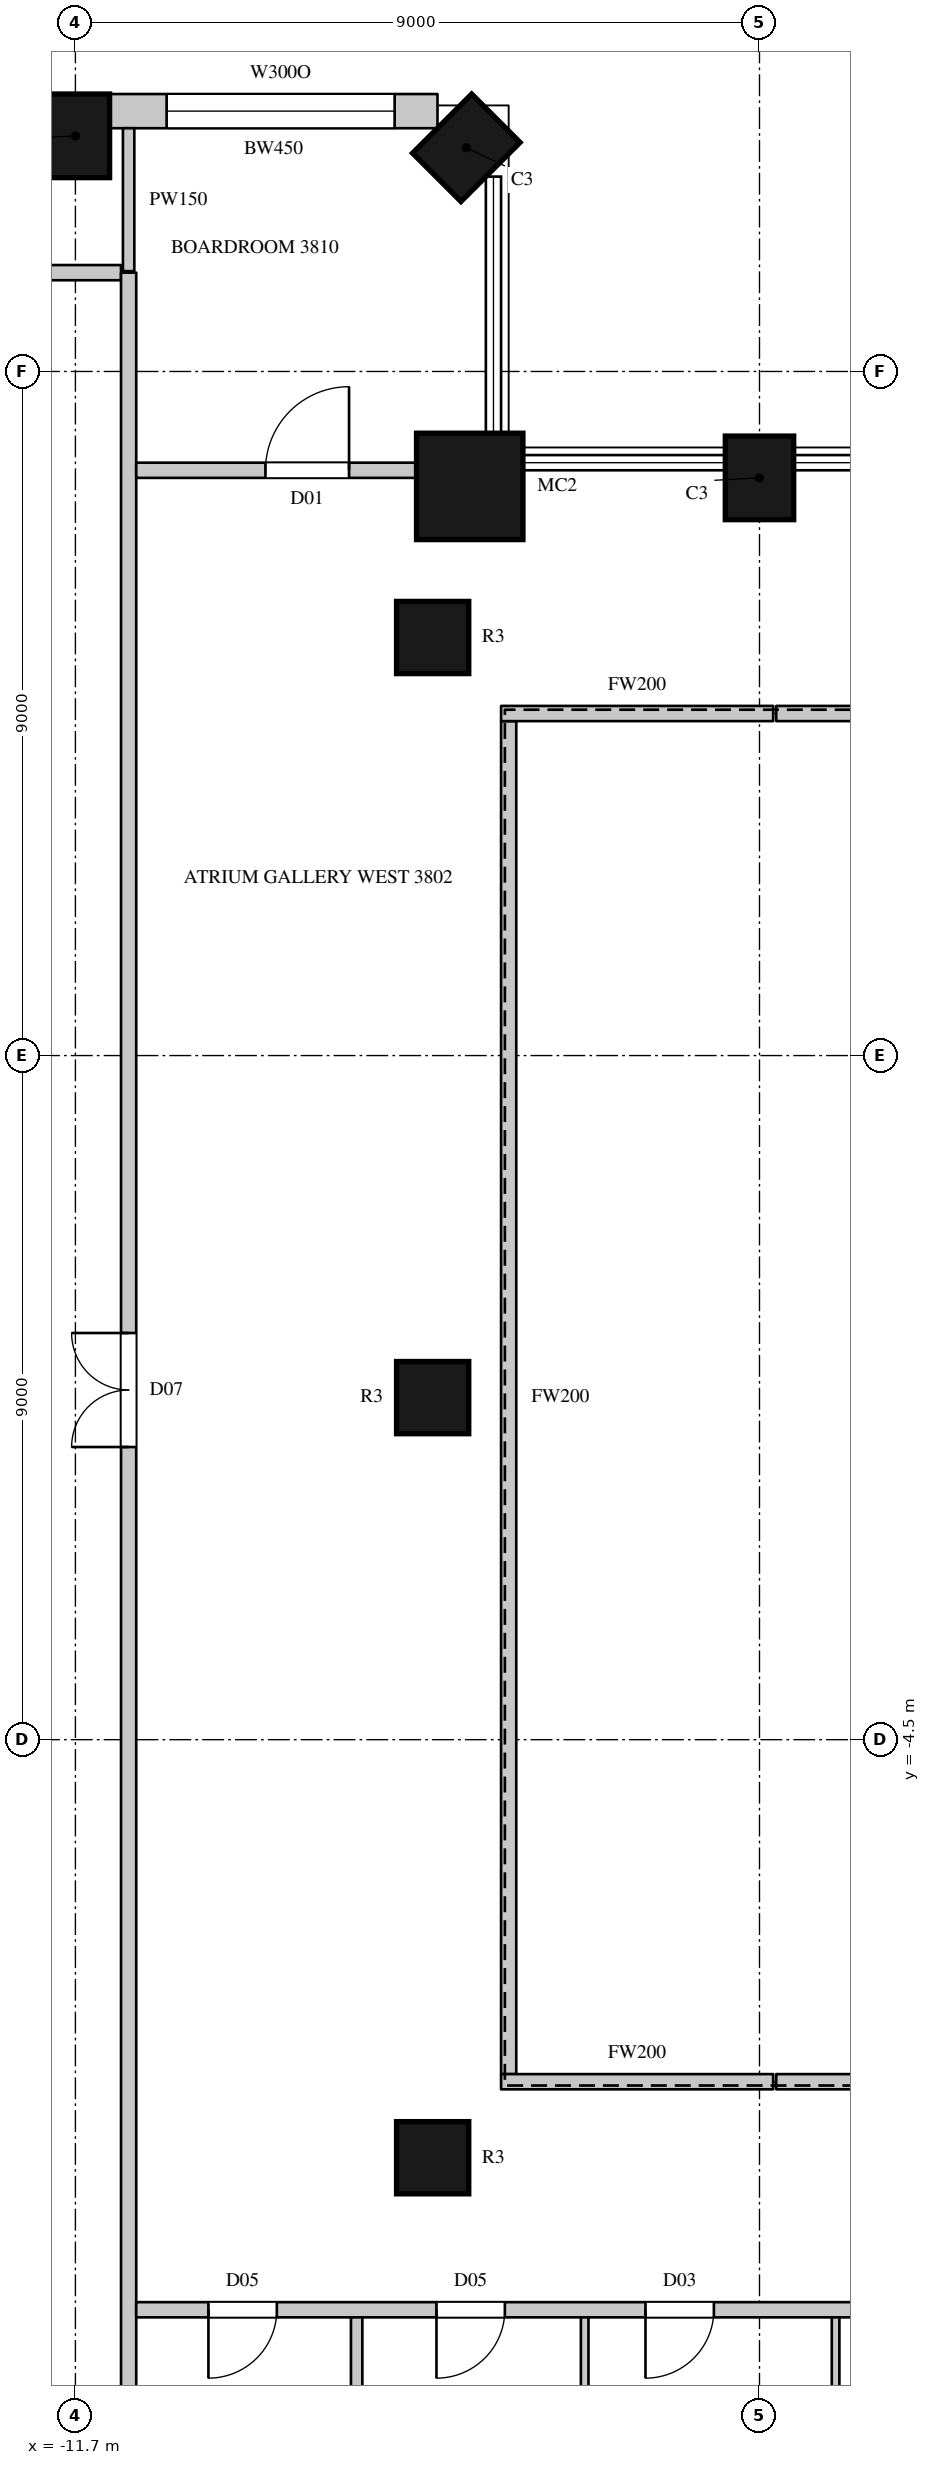
"""IFC4 building model, lengths in metres.
Left out: names, types, materials, properties, quantities, classifications, styles, units other than length and angle.
Written with IfcOpenShell. Run it as: python <this file> out.ifc"""

import sys

from ifc_helpers import new_model, si_unit, direction, frame, frame_2d, origin, origin_2d, place, context, subcontext, project, spatial, rectangle, circle, extrude, element, fill, save


model = new_model("IFC4")
c1 = context("Model", 3, precision=1e-05, world=origin(), true_north=direction((0.0, 1.0)))
c2 = subcontext(c1, "Body", "Model", "MODEL_VIEW")
j1 = project(units=[si_unit("LENGTHUNIT", "METRE"), si_unit("PLANEANGLEUNIT", "RADIAN")], contexts=[c1])
p1 = place(None, origin())
s1 = spatial("IfcSite", under=j1, at=p1, CompositionType="ELEMENT")
p2 = place(p1, origin())
s2 = spatial("IfcBuilding", under=s1, at=p2, CompositionType="ELEMENT")
p3 = place(p2, frame((0.0, 0.0, 176.9)))
s3 = spatial("IfcBuildingStorey", under=s2, at=p3, CompositionType="ELEMENT", Elevation=176.9)
p4 = place(p3, frame((-2.7, 12.1, 0.0), z_axis=(0.0, 0.0, 1.0), x_axis=(-1.0, 0.0, 0.0)))
e1 = element("IfcColumn", 1, at=p4, inside=s3, PredefinedType="COLUMN", context=c2, shape_type="SweptSolid", body=[
    extrude(rectangle(XDim=0.9, YDim=1.1, at=origin_2d()), origin(), (0.0, 0.0, 1.0), 4.1),
])
p5 = place(p3, frame((-6.512, 11.988, 0.0), z_axis=(0.0, 0.0, 1.0), x_axis=(1.0, 0.0, 0.0)))
e2 = element("IfcColumn", 2, at=p5, inside=s3, PredefinedType="COLUMN", context=c2, shape_type="SweptSolid", body=[
    extrude(circle(Radius=0.7, at=origin_2d()), origin(), (0.0, 0.0, 1.0), 4.1),
])
for number, where, z_axis, x_axis in (
    (3, (-6.557, 16.443, 0.0), (0.0, 0.0, 1.0), (-0.707, 0.707, 0.0)),
    (4, (-11.7, 16.6, 0.0), (0.0, 0.0, 1.0), (-1.0, 0.0, 0.0)),
):
    element("IfcColumn", number, at=place(p3, frame(where, z_axis=z_axis, x_axis=x_axis)), inside=s3, PredefinedType="COLUMN", context=c2, shape_type="SweptSolid", body=[
        extrude(rectangle(XDim=0.9, YDim=1.1, at=origin_2d()), origin(), (0.0, 0.0, 1.0), 4.1),
    ])
for number, where, z_axis, x_axis in (
    (5, (-7.0, -10.0, 0.0), (0.0, 0.0, 1.0), (1.0, 0.0, 0.0)),
    (6, (-7.0, 0.0, 0.0), (0.0, 0.0, 1.0), (1.0, 0.0, 0.0)),
    (7, (-7.0, 10.0, 0.0), (0.0, 0.0, 1.0), (1.0, 0.0, 0.0)),
):
    element("IfcColumn", number, at=place(p3, frame(where, z_axis=z_axis, x_axis=x_axis)), inside=s3, PredefinedType="COLUMN", context=c2, shape_type="SweptSolid", body=[
        extrude(circle(Radius=0.475, at=origin_2d()), origin(), (0.0, 0.0, 1.0), 4.1),
    ])
p6 = place(p3, frame((-6.936, 16.925, 0.0), z_axis=(0.0, 0.0, 1.0), x_axis=(-1.0, 0.0, 0.0)))
e8 = element("IfcWall", 8, at=p6, inside=s3, PredefinedType="SOLIDWALL", context=c2, shape_type="SweptSolid", body=[
    extrude(rectangle(XDim=4.314, YDim=0.45, at=frame_2d((2.157, 0.0))), origin(), (0.0, 0.0, 1.0), 3.8),
])
p7 = place(p6, frame((0.564, 0.0, 1.05)))
e9 = element("IfcOpeningElement", 9, at=p7, cuts=e8, PredefinedType="OPENING", context=c2, shape_type="SweptSolid", body=[
    extrude(rectangle(XDim=3.0, YDim=2.4, at=frame_2d((1.5, 1.2))), frame((0.0, 0.235, 0.0), z_axis=(0.0, -1.0, 0.0), x_axis=(1.0, 0.0, 0.0)), (0.0, 0.0, 1.0), 0.47),
])
p8 = place(p3, frame((-13.97, 14.8, 0.0), z_axis=(0.0, 0.0, 1.0), x_axis=(1.0, 0.0, 0.0)))
e10 = element("IfcWall", 10, at=p8, inside=s3, PredefinedType="PARTITIONING", context=c2, shape_type="SweptSolid", body=[
    extrude(rectangle(XDim=2.87, YDim=0.2, at=frame_2d((1.435, 0.0))), origin(), (0.0, 0.0, 1.0), 3.8),
])
p9 = place(p3, frame((-11.0, -14.8, 0.0), z_axis=(0.0, 0.0, 1.0), x_axis=(0.0, 1.0, 0.0)))
e11 = element("IfcWall", 11, at=p9, inside=s3, PredefinedType="PARTITIONING", context=c2, shape_type="SweptSolid", body=[
    extrude(rectangle(XDim=29.6, YDim=0.2, at=frame_2d((14.8, 0.0))), origin(), (0.0, 0.0, 1.0), 3.8),
])
p10 = place(p9, frame((14.15, 0.0, 0.0)))
e12 = element("IfcOpeningElement", 12, at=p10, cuts=e11, PredefinedType="OPENING", context=c2, shape_type="SweptSolid", body=[
    extrude(rectangle(XDim=1.5, YDim=2.4, at=frame_2d((0.75, 1.2))), frame((0.0, 0.11, 0.0), z_axis=(0.0, -1.0, 0.0), x_axis=(1.0, 0.0, 0.0)), (0.0, 0.0, 1.0), 0.22),
])
p11 = place(p3, frame((-10.9, -12.0, 0.0), z_axis=(0.0, 0.0, 1.0), x_axis=(1.0, 0.0, 0.0)))
e13 = element("IfcWall", 13, at=p11, inside=s3, PredefinedType="PARTITIONING", context=c2, shape_type="SweptSolid", body=[
    extrude(rectangle(XDim=21.8, YDim=0.2, at=frame_2d((10.9, 0.0))), origin(), (0.0, 0.0, 1.0), 3.8),
])
p12 = place(p11, frame((0.95, 0.0, 0.0)))
e14 = element("IfcOpeningElement", 14, at=p12, cuts=e13, PredefinedType="OPENING", context=c2, shape_type="SweptSolid", body=[
    extrude(rectangle(XDim=0.9, YDim=2.2, at=frame_2d((0.45, 1.1))), frame((0.0, 0.11, 0.0), z_axis=(0.0, -1.0, 0.0), x_axis=(1.0, 0.0, 0.0)), (0.0, 0.0, 1.0), 0.22),
])
p13 = place(p11, frame((3.95, 0.0, 0.0)))
e15 = element("IfcOpeningElement", 15, at=p13, cuts=e13, PredefinedType="OPENING", context=c2, shape_type="SweptSolid", body=[
    extrude(rectangle(XDim=0.9, YDim=2.2, at=frame_2d((0.45, 1.1))), frame((0.0, 0.11, 0.0), z_axis=(0.0, -1.0, 0.0), x_axis=(1.0, 0.0, 0.0)), (0.0, 0.0, 1.0), 0.22),
])
p14 = place(p11, frame((6.7, 0.0, 0.0)))
e16 = element("IfcOpeningElement", 16, at=p14, cuts=e13, PredefinedType="OPENING", context=c2, shape_type="SweptSolid", body=[
    extrude(rectangle(XDim=0.9, YDim=2.2, at=frame_2d((0.45, 1.1))), frame((0.0, 0.11, 0.0), z_axis=(0.0, -1.0, 0.0), x_axis=(1.0, 0.0, 0.0)), (0.0, 0.0, 1.0), 0.22),
])
p15 = place(p11, frame((10.0, 0.0, 0.0)))
e17 = element("IfcOpeningElement", 17, at=p15, cuts=e13, PredefinedType="OPENING", context=c2, shape_type="SweptSolid", body=[
    extrude(rectangle(XDim=0.9, YDim=2.2, at=frame_2d((0.45, 1.1))), frame((0.0, 0.11, 0.0), z_axis=(0.0, -1.0, 0.0), x_axis=(1.0, 0.0, 0.0)), (0.0, 0.0, 1.0), 0.22),
])
p16 = place(p11, frame((13.55, 0.0, 0.0)))
e18 = element("IfcOpeningElement", 18, at=p16, cuts=e13, PredefinedType="OPENING", context=c2, shape_type="SweptSolid", body=[
    extrude(rectangle(XDim=0.9, YDim=2.2, at=frame_2d((0.45, 1.1))), frame((0.0, 0.11, 0.0), z_axis=(0.0, -1.0, 0.0), x_axis=(1.0, 0.0, 0.0)), (0.0, 0.0, 1.0), 0.22),
])
p17 = place(p11, frame((15.8, 0.0, 0.0)))
e19 = element("IfcOpeningElement", 19, at=p17, cuts=e13, PredefinedType="OPENING", context=c2, shape_type="SweptSolid", body=[
    extrude(rectangle(XDim=1.1, YDim=2.4, at=frame_2d((0.55, 1.2))), frame((0.0, 0.11, 0.0), z_axis=(0.0, -1.0, 0.0), x_axis=(1.0, 0.0, 0.0)), (0.0, 0.0, 1.0), 0.22),
])
p18 = place(p11, frame((18.0, 0.0, 0.0)))
e20 = element("IfcOpeningElement", 20, at=p18, cuts=e13, PredefinedType="OPENING", context=c2, shape_type="SweptSolid", body=[
    extrude(rectangle(XDim=1.1, YDim=2.4, at=frame_2d((0.55, 1.2))), frame((0.0, 0.11, 0.0), z_axis=(0.0, -1.0, 0.0), x_axis=(1.0, 0.0, 0.0)), (0.0, 0.0, 1.0), 0.22),
])
p19 = place(p3, frame((-10.9, 12.2, 0.0), z_axis=(0.0, 0.0, 1.0), x_axis=(1.0, 0.0, 0.0)))
e21 = element("IfcWall", 21, at=p19, inside=s3, PredefinedType="PARTITIONING", context=c2, shape_type="SweptSolid", body=[
    extrude(rectangle(XDim=3.704, YDim=0.2, at=frame_2d((1.852, 0.0))), origin(), (0.0, 0.0, 1.0), 3.8),
])
p20 = place(p19, frame((1.7, 0.0, 0.0)))
e22 = element("IfcOpeningElement", 22, at=p20, cuts=e21, PredefinedType="OPENING", context=c2, shape_type="SweptSolid", body=[
    extrude(rectangle(XDim=1.1, YDim=2.4, at=frame_2d((0.55, 1.2))), frame((0.0, 0.11, 0.0), z_axis=(0.0, -1.0, 0.0), x_axis=(1.0, 0.0, 0.0)), (0.0, 0.0, 1.0), 0.22),
])
p21 = place(p3, frame((-6.0, -8.9, 0.0), z_axis=(0.0, 0.0, 1.0), x_axis=(0.0, 1.0, 0.0)))
e23 = element("IfcWall", 23, at=p21, inside=s3, PredefinedType="PARTITIONING", context=c2, shape_type="SweptSolid", body=[
    extrude(rectangle(XDim=17.8, YDim=0.2, at=frame_2d((8.9, 0.0))), origin(), (0.0, 0.0, 1.0), 3.8),
])
for number, where, z_axis, x_axis in (
    (24, (-6.1, -9.0, 0.0), (0.0, 0.0, 1.0), (1.0, 0.0, 0.0)),
    (25, (-6.1, 9.0, 0.0), (0.0, 0.0, 1.0), (1.0, 0.0, 0.0)),
):
    element("IfcWall", number, at=place(p3, frame(where, z_axis=z_axis, x_axis=x_axis)), inside=s3, PredefinedType="PARTITIONING", context=c2, shape_type="SweptSolid", body=[
        extrude(rectangle(XDim=3.58, YDim=0.2, at=frame_2d((1.79, 0.0))), origin(), (0.0, 0.0, 1.0), 3.8),
    ])
for number, where, z_axis, x_axis in (
    (26, (-2.48, -9.0, 0.0), (0.0, 0.0, 1.0), (1.0, 0.0, 0.0)),
    (27, (-2.48, 9.0, 0.0), (0.0, 0.0, 1.0), (1.0, 0.0, 0.0)),
):
    element("IfcWall", number, at=place(p3, frame(where, z_axis=z_axis, x_axis=x_axis)), inside=s3, PredefinedType="PARTITIONING", context=c2, shape_type="SweptSolid", body=[
        extrude(rectangle(XDim=10.58, YDim=0.2, at=frame_2d((5.29, 0.0))), origin(), (0.0, 0.0, 1.0), 3.8),
    ])
p22 = place(p3, frame((-11.0, 14.82, 0.0), z_axis=(0.0, 0.0, 1.0), x_axis=(0.0, 1.0, 0.0)))
e28 = element("IfcWall", 28, at=p22, inside=s3, PredefinedType="PARTITIONING", context=c2, shape_type="SweptSolid", body=[
    extrude(rectangle(XDim=1.88, YDim=0.15, at=frame_2d((0.94, 0.0))), origin(), (0.0, 0.0, 1.0), 3.8),
])
p23 = place(p3, frame((-8.0, -16.7, 0.0), z_axis=(0.0, 0.0, 1.0), x_axis=(0.0, 1.0, 0.0)))
e29 = element("IfcWall", 29, at=p23, inside=s3, PredefinedType="PARTITIONING", context=c2, shape_type="SweptSolid", body=[
    extrude(rectangle(XDim=4.6, YDim=0.15, at=frame_2d((2.3, 0.0))), origin(), (0.0, 0.0, 1.0), 3.8),
])
for number, where, z_axis, x_axis in (
    (30, (-5.0, -16.7, 0.0), (0.0, 0.0, 1.0), (0.0, 1.0, 0.0)),
    (31, (-1.699, -16.7, 0.0), (0.0, 0.0, 1.0), (0.0, 1.0, 0.0)),
):
    element("IfcWall", number, at=place(p3, frame(where, z_axis=z_axis, x_axis=x_axis)), inside=s3, PredefinedType="PARTITIONING", context=c2, shape_type="SweptSolid", body=[
        extrude(rectangle(XDim=4.6, YDim=0.1, at=frame_2d((2.3, 0.0))), origin(), (0.0, 0.0, 1.0), 3.8),
    ])
p24 = place(p7, origin())
e32 = element("IfcWindow", 32, at=p24, inside=s3, PartitioningType="SINGLE_PANEL", PredefinedType="WINDOW", context=c2, shape_type="SweptSolid", body=[
    extrude(rectangle(XDim=3.0, YDim=2.4, at=frame_2d((1.5, 1.2))), frame((0.0, 0.135, 0.0), z_axis=(0.0, -1.0, 0.0), x_axis=(1.0, 0.0, 0.0)), (0.0, 0.0, 1.0), 0.06),
])
fill(e9, e32)
p25 = place(p10, origin())
e33 = element("IfcDoor", 33, at=p25, inside=s3, OperationType="DOUBLE_DOOR_SINGLE_SWING", PredefinedType="DOOR", context=c2, shape_type="SweptSolid", body=[
    extrude(rectangle(XDim=1.5, YDim=2.4, at=frame_2d((0.75, 1.2))), frame((0.0, 0.025, 0.0), z_axis=(0.0, -1.0, 0.0), x_axis=(1.0, 0.0, 0.0)), (0.0, 0.0, 1.0), 0.05),
])
fill(e12, e33)
p26 = place(p12, origin())
e34 = element("IfcDoor", 34, at=p26, inside=s3, OperationType="SINGLE_SWING_RIGHT", PredefinedType="DOOR", context=c2, shape_type="SweptSolid", body=[
    extrude(rectangle(XDim=0.9, YDim=2.2, at=frame_2d((0.45, 1.1))), frame((0.0, 0.025, 0.0), z_axis=(0.0, -1.0, 0.0), x_axis=(1.0, 0.0, 0.0)), (0.0, 0.0, 1.0), 0.05),
])
fill(e14, e34)
p27 = place(p13, origin())
e35 = element("IfcDoor", 35, at=p27, inside=s3, OperationType="SINGLE_SWING_RIGHT", PredefinedType="DOOR", context=c2, shape_type="SweptSolid", body=[
    extrude(rectangle(XDim=0.9, YDim=2.2, at=frame_2d((0.45, 1.1))), frame((0.0, 0.025, 0.0), z_axis=(0.0, -1.0, 0.0), x_axis=(1.0, 0.0, 0.0)), (0.0, 0.0, 1.0), 0.05),
])
fill(e15, e35)
p28 = place(p14, origin())
e36 = element("IfcDoor", 36, at=p28, inside=s3, OperationType="SINGLE_SWING_RIGHT", PredefinedType="DOOR", context=c2, shape_type="SweptSolid", body=[
    extrude(rectangle(XDim=0.9, YDim=2.2, at=frame_2d((0.45, 1.1))), frame((0.0, 0.025, 0.0), z_axis=(0.0, -1.0, 0.0), x_axis=(1.0, 0.0, 0.0)), (0.0, 0.0, 1.0), 0.05),
])
fill(e16, e36)
p29 = place(p20, origin())
e37 = element("IfcDoor", 37, at=p29, inside=s3, OperationType="SINGLE_SWING_RIGHT", PredefinedType="DOOR", context=c2, shape_type="SweptSolid", body=[
    extrude(rectangle(XDim=1.1, YDim=2.4, at=frame_2d((0.55, 1.2))), frame((0.0, 0.025, 0.0), z_axis=(0.0, -1.0, 0.0), x_axis=(1.0, 0.0, 0.0)), (0.0, 0.0, 1.0), 0.05),
])
fill(e22, e37)
save(model, sys.argv[1])
